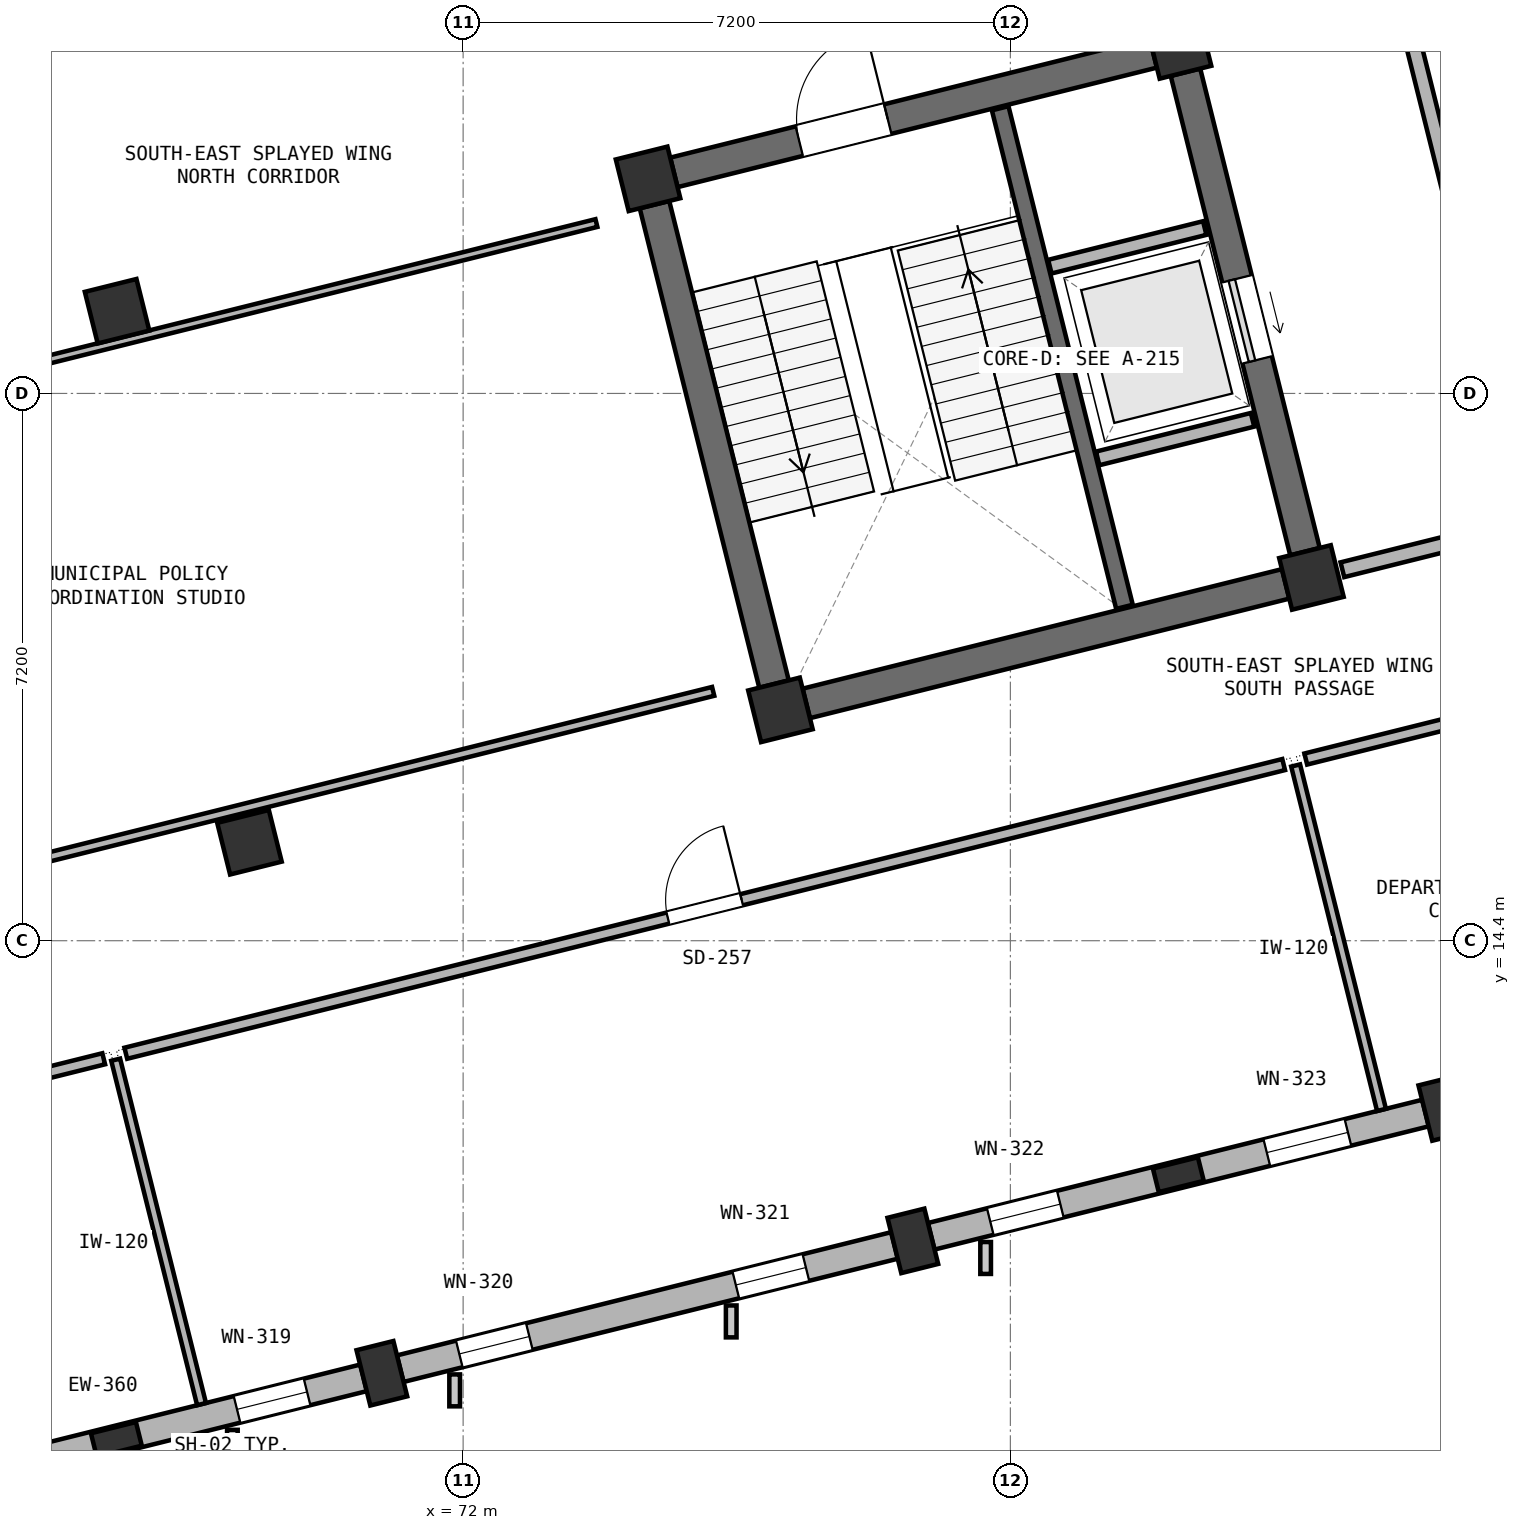
"""IFC4 building model, lengths in metres.
Left out: names, types, materials, properties, quantities, classifications, styles, units other than length and angle.
Written with IfcOpenShell. Run it as: python <this file> out.ifc"""

import sys

from ifc_helpers import new_model, si_unit, direction, frame, frame_2d, origin, origin_2d, place, context, subcontext, project, spatial, rectangle, extrude, element, fill, save


model = new_model("IFC4")
c1 = context("Model", 3, precision=1e-05, world=origin(), true_north=direction((0.0, 1.0)))
c2 = subcontext(c1, "Body", "Model", "MODEL_VIEW")
j1 = project(units=[si_unit("LENGTHUNIT", "METRE"), si_unit("PLANEANGLEUNIT", "RADIAN")], contexts=[c1])
p1 = place(None, origin())
s1 = spatial("IfcSite", under=j1, at=p1, CompositionType="ELEMENT")
p2 = place(p1, origin())
s2 = spatial("IfcBuilding", under=s1, at=p2, CompositionType="ELEMENT")
p3 = place(p2, frame((0.0, 0.0, 14.4)))
s3 = spatial("IfcBuildingStorey", under=s2, at=p3, CompositionType="ELEMENT", Elevation=14.4)
p4 = place(p3, frame((70.931, 8.709, 0.0), z_axis=(0.0, 0.0, 1.0), x_axis=(0.970295726276, 0.2419218956, 0.0)))
e1 = element("IfcColumn", 1, at=p4, inside=s3, PredefinedType="COLUMN", context=c2, shape_type="SweptSolid", body=[
    extrude(rectangle(XDim=0.5, YDim=0.75, at=origin_2d()), origin(), (0.0, 0.0, 1.0), 4.2),
])
for number, where, z_axis, x_axis in (
    (2, (69.189, 15.695, 0.0), (0.0, 0.0, 1.0), (0.97, 0.242, 0.0)),
    (3, (67.447, 22.681, 0.0), (0.0, 0.0, 1.0), (0.97, 0.242, 0.0)),
):
    element("IfcColumn", number, at=place(p3, frame(where, z_axis=z_axis, x_axis=x_axis)), inside=s3, PredefinedType="COLUMN", context=c2, shape_type="SweptSolid", body=[
        extrude(rectangle(XDim=0.7, YDim=0.7, at=origin_2d()), origin(), (0.0, 0.0, 1.0), 4.2),
    ])
p5 = place(p3, frame((77.917, 10.451, 0.0), z_axis=(0.0, 0.0, 1.0), x_axis=(0.970295726276, 0.2419218956, 0.0)))
e4 = element("IfcColumn", 4, at=p5, inside=s3, PredefinedType="COLUMN", context=c2, shape_type="SweptSolid", body=[
    extrude(rectangle(XDim=0.5, YDim=0.75, at=origin_2d()), origin(), (0.0, 0.0, 1.0), 4.2),
])
for number, where, z_axis, x_axis in (
    (5, (76.175, 17.437, 0.0), (0.0, 0.0, 1.0), (0.97, 0.242, 0.0)),
    (6, (74.433, 24.423, 0.0), (0.0, 0.0, 1.0), (0.97, 0.242, 0.0)),
):
    element("IfcColumn", number, at=place(p3, frame(where, z_axis=z_axis, x_axis=x_axis)), inside=s3, PredefinedType="COLUMN", context=c2, shape_type="SweptSolid", body=[
        extrude(rectangle(XDim=0.7, YDim=0.7, at=origin_2d()), origin(), (0.0, 0.0, 1.0), 4.2),
    ])
p6 = place(p3, frame((84.903, 12.193, 0.0), z_axis=(0.0, 0.0, 1.0), x_axis=(0.970295726276, 0.2419218956, 0.0)))
e7 = element("IfcColumn", 7, at=p6, inside=s3, PredefinedType="COLUMN", context=c2, shape_type="SweptSolid", body=[
    extrude(rectangle(XDim=0.5, YDim=0.75, at=origin_2d()), origin(), (0.0, 0.0, 1.0), 4.2),
])
for number, where, z_axis, x_axis in (
    (8, (83.161, 19.179, 0.0), (0.0, 0.0, 1.0), (0.97, 0.242, 0.0)),
    (9, (81.419, 26.165, 0.0), (0.0, 0.0, 1.0), (0.97, 0.242, 0.0)),
):
    element("IfcColumn", number, at=place(p3, frame(where, z_axis=z_axis, x_axis=x_axis)), inside=s3, PredefinedType="COLUMN", context=c2, shape_type="SweptSolid", body=[
        extrude(rectangle(XDim=0.7, YDim=0.7, at=origin_2d()), origin(), (0.0, 0.0, 1.0), 4.2),
    ])
for number, where, z_axis, x_axis in (
    (10, (67.438, 7.838, 0.0), (0.0, 0.0, 1.0), (0.97, 0.242, 0.0)),
    (11, (81.41, 11.322, 0.0), (0.0, 0.0, 1.0), (0.97, 0.242, 0.0)),
):
    element("IfcColumn", number, at=place(p3, frame(where, z_axis=z_axis, x_axis=x_axis)), inside=s3, PredefinedType="PILASTER", context=c2, shape_type="SweptSolid", body=[
        extrude(rectangle(XDim=0.61, YDim=0.32, at=origin_2d()), origin(), (0.0, 0.0, 1.0), 4.2),
    ])
p7 = place(p3, frame((76.515, 17.522, 0.0), z_axis=(0.0, 0.0, 1.0), x_axis=(0.970294759049, 0.241925774902, 0.0)))
e12 = element("IfcWall", 12, at=p7, inside=s3, PredefinedType="SHEAR", context=c2, shape_type="SweptSolid", body=[
    extrude(rectangle(XDim=6.5, YDim=0.4, at=frame_2d((3.25, 0.0))), origin(), (0.0, 0.0, 1.0), 4.2),
])
p8 = place(p3, frame((83.076, 19.519, 0.0), z_axis=(0.0, 0.0, 1.0), x_axis=(-0.241925774902, 0.970294759049, 0.0)))
e13 = element("IfcWall", 13, at=p8, inside=s3, PredefinedType="SHEAR", context=c2, shape_type="SweptSolid", body=[
    extrude(rectangle(XDim=6.5, YDim=0.4, at=frame_2d((3.25, 0.0))), origin(), (0.0, 0.0, 1.0), 4.2),
])
p9 = place(p8, frame((2.6, 0.0, 0.0)))
e14 = element("IfcOpeningElement", 14, at=p9, cuts=e13, PredefinedType="OPENING", context=c2, shape_type="SweptSolid", body=[
    extrude(rectangle(XDim=1.1, YDim=2.2, at=frame_2d((0.55, 1.1))), frame((0.0, 0.21, 0.0), z_axis=(0.0, -1.0, 0.0), x_axis=(1.0, 0.0, 0.0)), (0.0, 0.0, 1.0), 0.42),
])
p10 = place(p3, frame((81.08, 26.081, 0.0), z_axis=(0.0, 0.0, 1.0), x_axis=(-0.970294759049, -0.241925774902, 0.0)))
e15 = element("IfcWall", 15, at=p10, inside=s3, PredefinedType="SHEAR", context=c2, shape_type="SweptSolid", body=[
    extrude(rectangle(XDim=6.5, YDim=0.4, at=frame_2d((3.25, 0.0))), origin(), (0.0, 0.0, 1.0), 4.2),
])
p11 = place(p10, frame((3.6, 0.0, 0.0)))
e16 = element("IfcOpeningElement", 16, at=p11, cuts=e15, PredefinedType="OPENING", context=c2, shape_type="SweptSolid", body=[
    extrude(rectangle(XDim=1.2, YDim=2.2, at=frame_2d((0.6, 1.1))), frame((0.0, 0.21, 0.0), z_axis=(0.0, -1.0, 0.0), x_axis=(1.0, 0.0, 0.0)), (0.0, 0.0, 1.0), 0.42),
])
p12 = place(p3, frame((74.518, 24.084, 0.0), z_axis=(0.0, 0.0, 1.0), x_axis=(0.241925774902, -0.970294759049, 0.0)))
e17 = element("IfcWall", 17, at=p12, inside=s3, PredefinedType="SHEAR", context=c2, shape_type="SweptSolid", body=[
    extrude(rectangle(XDim=6.5, YDim=0.4, at=frame_2d((3.25, 0.0))), origin(), (0.0, 0.0, 1.0), 4.2),
])
p13 = place(p3, frame((80.701, 18.792, 0.0), z_axis=(0.0, 0.0, 1.0), x_axis=(-0.241898249226, 0.970301621673, 0.0)))
e18 = element("IfcWall", 18, at=p13, inside=s3, PredefinedType="SHEAR", context=c2, shape_type="SweptSolid", body=[
    extrude(rectangle(XDim=6.76, YDim=0.225, at=frame_2d((3.38, 0.0))), origin(), (0.0, 0.0, 1.0), 4.2),
])
for number, where, z_axis, x_axis in (
    (19, (80.349, 20.745, 0.0), (0.0, 0.0, 1.0), (0.97, 0.242, 0.0)),
    (20, (79.72, 23.268, 0.0), (0.0, 0.0, 1.0), (0.97, 0.242, 0.0)),
):
    element("IfcWall", number, at=place(p3, frame(where, z_axis=z_axis, x_axis=x_axis)), inside=s3, PredefinedType="PARTITIONING", context=c2, shape_type="SweptSolid", body=[
        extrude(rectangle(XDim=2.1, YDim=0.185, at=frame_2d((1.05, 0.0))), origin(), (0.0, 0.0, 1.0), 4.2),
    ])
p14 = place(p3, frame((64.185, 7.027, 0.0), z_axis=(0.0, 0.0, 1.0), x_axis=(0.970296540998, 0.241918627903, 0.0)))
e21 = element("IfcWall", 21, at=p14, inside=s3, PredefinedType="SOLIDWALL", context=c2, shape_type="SweptSolid", body=[
    extrude(rectangle(XDim=6.704, YDim=0.36, at=frame_2d((3.352, 0.0))), origin(), (0.0, 0.0, 1.0), 3.04),
])
p15 = place(p14, frame((0.802, 0.0, 0.7)))
e22 = element("IfcOpeningElement", 22, at=p15, cuts=e21, PredefinedType="OPENING", context=c2, shape_type="SweptSolid", body=[
    extrude(rectangle(XDim=1.1, YDim=2.19, at=frame_2d((0.55, 1.095))), frame((0.0, 0.19, 0.0), z_axis=(0.0, -1.0, 0.0), x_axis=(1.0, 0.0, 0.0)), (0.0, 0.0, 1.0), 0.38),
])
p16 = place(p14, frame((4.988, 0.0, 0.7)))
e23 = element("IfcOpeningElement", 23, at=p16, cuts=e21, PredefinedType="OPENING", context=c2, shape_type="SweptSolid", body=[
    extrude(rectangle(XDim=0.95, YDim=2.15, at=frame_2d((0.475, 1.075))), frame((0.0, 0.19, 0.0), z_axis=(0.0, -1.0, 0.0), x_axis=(1.0, 0.0, 0.0)), (0.0, 0.0, 1.0), 0.38),
])
p17 = place(p3, frame((71.171, 8.769, 0.0), z_axis=(0.0, 0.0, 1.0), x_axis=(0.97029440959, 0.241927176478, 0.0)))
e24 = element("IfcWall", 24, at=p17, inside=s3, PredefinedType="SOLIDWALL", context=c2, shape_type="SweptSolid", body=[
    extrude(rectangle(XDim=6.704, YDim=0.36, at=frame_2d((3.352, 0.0))), origin(), (0.0, 0.0, 1.0), 3.04),
])
p18 = place(p17, frame((0.802, 0.0, 0.7)))
e25 = element("IfcOpeningElement", 25, at=p18, cuts=e24, PredefinedType="OPENING", context=c2, shape_type="SweptSolid", body=[
    extrude(rectangle(XDim=0.95, YDim=2.15, at=frame_2d((0.475, 1.075))), frame((0.0, 0.19, 0.0), z_axis=(0.0, -1.0, 0.0), x_axis=(1.0, 0.0, 0.0)), (0.0, 0.0, 1.0), 0.38),
])
p19 = place(p17, frame((4.552, 0.0, 0.7)))
e26 = element("IfcOpeningElement", 26, at=p19, cuts=e24, PredefinedType="OPENING", context=c2, shape_type="SweptSolid", body=[
    extrude(rectangle(XDim=0.95, YDim=2.15, at=frame_2d((0.475, 1.075))), frame((0.0, 0.19, 0.0), z_axis=(0.0, -1.0, 0.0), x_axis=(1.0, 0.0, 0.0)), (0.0, 0.0, 1.0), 0.38),
])
p20 = place(p3, frame((78.157, 10.511, 0.0), z_axis=(0.0, 0.0, 1.0), x_axis=(0.970296540998, 0.241918627903, 0.0)))
e27 = element("IfcWall", 27, at=p20, inside=s3, PredefinedType="SOLIDWALL", context=c2, shape_type="SweptSolid", body=[
    extrude(rectangle(XDim=6.704, YDim=0.36, at=frame_2d((3.352, 0.0))), origin(), (0.0, 0.0, 1.0), 3.04),
])
p21 = place(p20, frame((0.802, 0.0, 0.7)))
e28 = element("IfcOpeningElement", 28, at=p21, cuts=e27, PredefinedType="OPENING", context=c2, shape_type="SweptSolid", body=[
    extrude(rectangle(XDim=0.95, YDim=2.15, at=frame_2d((0.475, 1.075))), frame((0.0, 0.19, 0.0), z_axis=(0.0, -1.0, 0.0), x_axis=(1.0, 0.0, 0.0)), (0.0, 0.0, 1.0), 0.38),
])
p22 = place(p20, frame((4.552, 0.0, 0.7)))
e29 = element("IfcOpeningElement", 29, at=p22, cuts=e27, PredefinedType="OPENING", context=c2, shape_type="SweptSolid", body=[
    extrude(rectangle(XDim=1.1, YDim=2.19, at=frame_2d((0.55, 1.095))), frame((0.0, 0.19, 0.0), z_axis=(0.0, -1.0, 0.0), x_axis=(1.0, 0.0, 0.0)), (0.0, 0.0, 1.0), 0.38),
])
p23 = place(p3, frame((86.072, 19.905, 0.0), z_axis=(0.0, 0.0, 1.0), x_axis=(-0.241937193493, 0.970291911955, 0.0)))
e30 = element("IfcWall", 30, at=p23, inside=s3, PredefinedType="PARTITIONING", context=c2, shape_type="SweptSolid", body=[
    extrude(rectangle(XDim=7.2, YDim=0.2, at=frame_2d((3.6, 0.0))), origin(), (0.0, 0.0, 1.0), 3.08),
])
p24 = place(p3, frame((83.569, 19.281, 0.0), z_axis=(0.0, 0.0, 1.0), x_axis=(0.970287048366, 0.241956698135, 0.0)))
e31 = element("IfcWall", 31, at=p24, inside=s3, PredefinedType="PARTITIONING", context=c2, shape_type="SweptSolid", body=[
    extrude(rectangle(XDim=2.58, YDim=0.2, at=frame_2d((1.29, 0.0))), origin(), (0.0, 0.0, 1.0), 3.08),
])
p25 = place(p3, frame((53.59, 9.436, 0.0), z_axis=(0.0, 0.0, 1.0), x_axis=(0.970295086625, 0.241924461086, 0.0)))
e32 = element("IfcWall", 32, at=p25, inside=s3, PredefinedType="PARTITIONING", context=c2, shape_type="SweptSolid", body=[
    extrude(rectangle(XDim=14.1, YDim=0.15, at=frame_2d((7.05, 0.0))), origin(), (0.0, 0.0, 1.0), 3.08),
])
p26 = place(p25, frame((6.25, 0.0, 0.0)))
e33 = element("IfcOpeningElement", 33, at=p26, cuts=e32, PredefinedType="OPENING", context=c2, shape_type="SweptSolid", body=[
    extrude(rectangle(XDim=1.6, YDim=2.2, at=frame_2d((0.8, 1.1))), frame((0.0, 0.085, 0.0), z_axis=(0.0, -1.0, 0.0), x_axis=(1.0, 0.0, 0.0)), (0.0, 0.0, 1.0), 0.17),
])
p27 = place(p3, frame((67.562, 12.919, 0.0), z_axis=(0.0, 0.0, 1.0), x_axis=(0.970296892124, 0.24191721959, 0.0)))
e34 = element("IfcWall", 34, at=p27, inside=s3, PredefinedType="PARTITIONING", context=c2, shape_type="SweptSolid", body=[
    extrude(rectangle(XDim=15.7, YDim=0.15, at=frame_2d((7.85, 0.0))), origin(), (0.0, 0.0, 1.0), 3.08),
])
p28 = place(p27, frame((7.35, 0.0, 0.0)))
e35 = element("IfcOpeningElement", 35, at=p28, cuts=e34, PredefinedType="OPENING", context=c2, shape_type="SweptSolid", body=[
    extrude(rectangle(XDim=1.0, YDim=2.2, at=frame_2d((0.5, 1.1))), frame((0.0, 0.085, 0.0), z_axis=(0.0, -1.0, 0.0), x_axis=(1.0, 0.0, 0.0)), (0.0, 0.0, 1.0), 0.17),
])
p29 = place(p3, frame((68.558, 8.303, 0.0), z_axis=(0.0, 0.0, 1.0), x_axis=(-0.241895920765, 0.97030220216, 0.0)))
e36 = element("IfcWall", 36, at=p29, inside=s3, PredefinedType="PARTITIONING", context=c2, shape_type="SweptSolid", body=[
    extrude(rectangle(XDim=4.67, YDim=0.12, at=frame_2d((2.335, 0.0))), origin(), (0.0, 0.0, 1.0), 3.08),
])
p30 = place(p3, frame((83.087, 16.79, 0.0), z_axis=(0.0, 0.0, 1.0), x_axis=(0.970289980954, 0.241944937661, 0.0)))
e37 = element("IfcWall", 37, at=p30, inside=s3, PredefinedType="PARTITIONING", context=c2, shape_type="SweptSolid", body=[
    extrude(rectangle(XDim=7.1, YDim=0.15, at=frame_2d((3.55, 0.0))), origin(), (0.0, 0.0, 1.0), 3.08),
])
p31 = place(p30, frame((3.05, 0.0, 0.0)))
e38 = element("IfcOpeningElement", 38, at=p31, cuts=e37, PredefinedType="OPENING", context=c2, shape_type="SweptSolid", body=[
    extrude(rectangle(XDim=1.0, YDim=2.2, at=frame_2d((0.5, 1.1))), frame((0.0, 0.085, 0.0), z_axis=(0.0, -1.0, 0.0), x_axis=(1.0, 0.0, 0.0)), (0.0, 0.0, 1.0), 0.17),
])
p32 = place(p3, frame((84.083, 12.174, 0.0), z_axis=(0.0, 0.0, 1.0), x_axis=(-0.241895920765, 0.97030220216, 0.0)))
e39 = element("IfcWall", 39, at=p32, inside=s3, PredefinedType="PARTITIONING", context=c2, shape_type="SweptSolid", body=[
    extrude(rectangle(XDim=4.67, YDim=0.12, at=frame_2d((2.335, 0.0))), origin(), (0.0, 0.0, 1.0), 3.08),
])
p33 = place(p3, frame((73.754, 23.842, 0.0), z_axis=(0.0, 0.0, 1.0), x_axis=(-0.970295954135, -0.241920981706, 0.0)))
e40 = element("IfcWall", 40, at=p33, inside=s3, PredefinedType="PARTITIONING", context=c2, shape_type="SweptSolid", body=[
    extrude(rectangle(XDim=18.6, YDim=0.105, at=frame_2d((9.3, 0.0))), origin(), (0.0, 0.0, 1.0), 3.08),
])
p34 = place(p33, frame((9.2, 0.0, 0.0)))
e41 = element("IfcOpeningElement", 41, at=p34, cuts=e40, PredefinedType="OPENING", context=c2, shape_type="SweptSolid", body=[
    extrude(rectangle(XDim=1.6, YDim=2.2, at=frame_2d((0.8, 1.1))), frame((0.0, 0.062, 0.0), z_axis=(0.0, -1.0, 0.0), x_axis=(1.0, 0.0, 0.0)), (0.0, 0.0, 1.0), 0.125),
])
p35 = place(p3, frame((57.242, 13.18, 0.0), z_axis=(0.0, 0.0, 1.0), x_axis=(0.970295185925, 0.24192406282, 0.0)))
e42 = element("IfcWall", 42, at=p35, inside=s3, PredefinedType="PARTITIONING", context=c2, shape_type="SweptSolid", body=[
    extrude(rectangle(XDim=18.6, YDim=0.12, at=frame_2d((9.3, 0.0))), origin(), (0.0, 0.0, 1.0), 3.08),
])
p36 = place(p9, origin())
e43 = element("IfcDoor", 43, at=p36, inside=s3, OperationType="SLIDING_TO_LEFT", PredefinedType="DOOR", context=c2, shape_type="SweptSolid", body=[
    extrude(rectangle(XDim=1.1, YDim=2.2, at=frame_2d((0.55, 1.1))), frame((0.0, 0.025, 0.0), z_axis=(0.0, -1.0, 0.0), x_axis=(1.0, 0.0, 0.0)), (0.0, 0.0, 1.0), 0.05),
])
fill(e14, e43)
p37 = place(p16, origin())
e44 = element("IfcWindow", 44, at=p37, inside=s3, PartitioningType="SINGLE_PANEL", PredefinedType="WINDOW", context=c2, shape_type="SweptSolid", body=[
    extrude(rectangle(XDim=0.95, YDim=2.15, at=frame_2d((0.475, 1.075))), frame((0.0, 0.03, 0.0), z_axis=(0.0, -1.0, 0.0), x_axis=(1.0, 0.0, 0.0)), (0.0, 0.0, 1.0), 0.06),
])
fill(e23, e44)
p38 = place(p18, origin())
e45 = element("IfcWindow", 45, at=p38, inside=s3, PartitioningType="SINGLE_PANEL", PredefinedType="WINDOW", context=c2, shape_type="SweptSolid", body=[
    extrude(rectangle(XDim=0.95, YDim=2.15, at=frame_2d((0.475, 1.075))), frame((0.0, 0.03, 0.0), z_axis=(0.0, -1.0, 0.0), x_axis=(1.0, 0.0, 0.0)), (0.0, 0.0, 1.0), 0.06),
])
fill(e25, e45)
p39 = place(p19, origin())
e46 = element("IfcWindow", 46, at=p39, inside=s3, PartitioningType="SINGLE_PANEL", PredefinedType="WINDOW", context=c2, shape_type="SweptSolid", body=[
    extrude(rectangle(XDim=0.95, YDim=2.15, at=frame_2d((0.475, 1.075))), frame((0.0, 0.03, 0.0), z_axis=(0.0, -1.0, 0.0), x_axis=(1.0, 0.0, 0.0)), (0.0, 0.0, 1.0), 0.06),
])
fill(e26, e46)
p40 = place(p21, origin())
e47 = element("IfcWindow", 47, at=p40, inside=s3, PartitioningType="SINGLE_PANEL", PredefinedType="WINDOW", context=c2, shape_type="SweptSolid", body=[
    extrude(rectangle(XDim=0.95, YDim=2.15, at=frame_2d((0.475, 1.075))), frame((0.0, 0.03, 0.0), z_axis=(0.0, -1.0, 0.0), x_axis=(1.0, 0.0, 0.0)), (0.0, 0.0, 1.0), 0.06),
])
fill(e28, e47)
p41 = place(p22, origin())
e48 = element("IfcWindow", 48, at=p41, inside=s3, PartitioningType="SINGLE_PANEL", PredefinedType="WINDOW", context=c2, shape_type="SweptSolid", body=[
    extrude(rectangle(XDim=1.1, YDim=2.19, at=frame_2d((0.55, 1.095))), frame((0.0, 0.03, 0.0), z_axis=(0.0, -1.0, 0.0), x_axis=(1.0, 0.0, 0.0)), (0.0, 0.0, 1.0), 0.06),
])
fill(e29, e48)
p42 = place(p11, frame((1.2, 0.0, 0.0), z_axis=(0.0, 0.0, 1.0), x_axis=(-1.0, 0.0, 0.0)))
e49 = element("IfcDoor", 49, at=p42, inside=s3, OperationType="SINGLE_SWING_RIGHT", PredefinedType="DOOR", context=c2, shape_type="SweptSolid", body=[
    extrude(rectangle(XDim=1.2, YDim=2.2, at=frame_2d((0.6, 1.1))), frame((0.0, 0.025, 0.0), z_axis=(0.0, -1.0, 0.0), x_axis=(1.0, 0.0, 0.0)), (0.0, 0.0, 1.0), 0.05),
])
fill(e16, e49)
p43 = place(p28, origin())
e50 = element("IfcDoor", 50, at=p43, inside=s3, OperationType="SINGLE_SWING_RIGHT", PredefinedType="DOOR", context=c2, shape_type="SweptSolid", body=[
    extrude(rectangle(XDim=1.0, YDim=2.2, at=frame_2d((0.5, 1.1))), frame((0.0, 0.025, 0.0), z_axis=(0.0, -1.0, 0.0), x_axis=(1.0, 0.0, 0.0)), (0.0, 0.0, 1.0), 0.05),
])
fill(e35, e50)
save(model, sys.argv[1])
